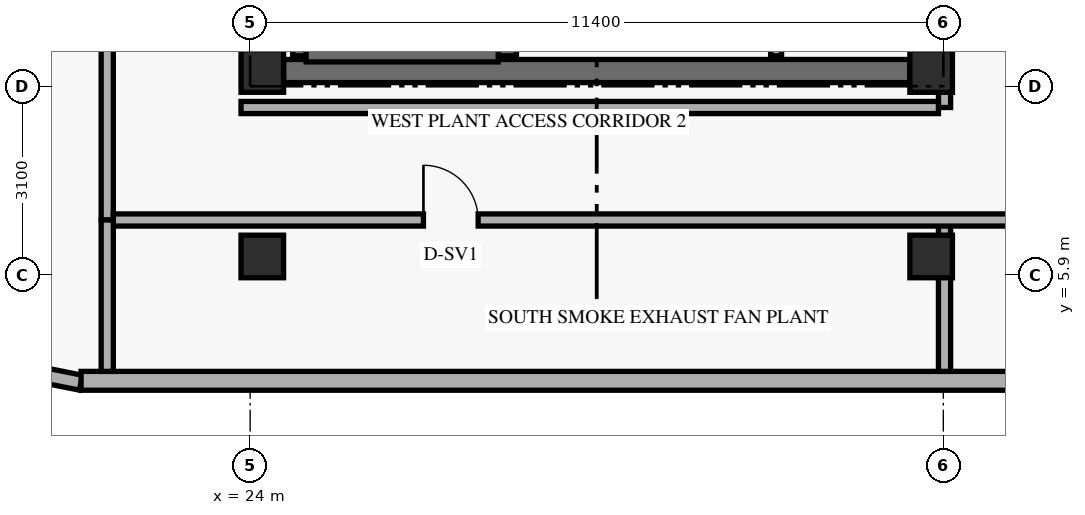
"""IFC4 building model, lengths in metres.
Left out: names, types, materials, properties, quantities, classifications, styles, units other than length and angle.
Written with IfcOpenShell. Run it as: python <this file> out.ifc"""

import sys

from ifc_helpers import new_model, si_unit, direction, frame, frame_2d, origin, origin_2d, place, context, subcontext, project, spatial, rectangle, extrude, element, fill, save


model = new_model("IFC4")
c1 = context("Model", 3, precision=1e-05, world=origin(), true_north=direction((0.0, 1.0)))
c2 = subcontext(c1, "Body", "Model", "MODEL_VIEW")
j1 = project(units=[si_unit("LENGTHUNIT", "METRE"), si_unit("PLANEANGLEUNIT", "RADIAN")], contexts=[c1])
p1 = place(None, origin())
s1 = spatial("IfcSite", under=j1, at=p1, CompositionType="ELEMENT")
p2 = place(p1, origin())
s2 = spatial("IfcBuilding", under=s1, at=p2, CompositionType="ELEMENT")
p3 = place(p2, frame((0.0, 0.0, 199.8)))
s3 = spatial("IfcBuildingStorey", under=s2, at=p3, CompositionType="ELEMENT", Elevation=199.8)
p4 = place(p3, frame((24.55, 9.25, 0.0), z_axis=(0.0, 0.0, 1.0), x_axis=(1.0, 0.0, 0.0)))
e1 = element("IfcWall", 1, at=p4, inside=s3, PredefinedType="SHEAR", context=c2, shape_type="SweptSolid", body=[
    extrude(rectangle(XDim=10.3, YDim=0.38, at=frame_2d((5.15, 0.0))), origin(), (0.0, 0.0, 1.0), 5.76),
])
p5 = place(p3, frame((24.81, 9.5, 0.0), z_axis=(0.0, 0.0, 1.0), x_axis=(0.0, 1.0, 0.0)))
e2 = element("IfcWall", 2, at=p5, inside=s3, PredefinedType="SHEAR", context=c2, shape_type="SweptSolid", body=[
    extrude(rectangle(XDim=7.76, YDim=0.22, at=frame_2d((3.88, 0.0))), origin(), (0.0, 0.0, 1.0), 5.76),
])
p6 = place(p3, frame((28.23, 9.5, 0.0), z_axis=(0.0, 0.0, 1.0), x_axis=(0.0, 1.0, 0.0)))
e3 = element("IfcWall", 3, at=p6, inside=s3, PredefinedType="SHEAR", context=c2, shape_type="SweptSolid", body=[
    extrude(rectangle(XDim=7.76, YDim=0.3, at=frame_2d((3.88, 0.0))), origin(), (0.0, 0.0, 1.0), 5.76),
])
p7 = place(p3, frame((24.92, 9.51, 0.0), z_axis=(0.0, 0.0, 1.0), x_axis=(1.0, 0.0, 0.0)))
e4 = element("IfcWall", 4, at=p7, inside=s3, PredefinedType="SHEAR", context=c2, shape_type="SweptSolid", body=[
    extrude(rectangle(XDim=3.16, YDim=0.22, at=frame_2d((1.58, 0.0))), origin(), (0.0, 0.0, 1.0), 5.76),
])
for number, where, z_axis, x_axis in (
    (5, (24.2, 6.2, 0.0), (0.0, 0.0, 1.0), (1.0, 0.0, 0.0)),
    (6, (24.2, 9.25, 0.0), (0.0, 0.0, 1.0), (1.0, 0.0, 0.0)),
    (7, (35.2, 6.2, 0.0), (0.0, 0.0, 1.0), (1.0, 0.0, 0.0)),
    (8, (35.2, 9.25, 0.0), (0.0, 0.0, 1.0), (1.0, 0.0, 0.0)),
):
    element("IfcColumn", number, at=place(p3, frame(where, z_axis=z_axis, x_axis=x_axis)), inside=s3, PredefinedType="COLUMN", context=c2, shape_type="SweptSolid", body=[
        extrude(rectangle(XDim=0.7, YDim=0.7, at=origin_2d()), origin(), (0.0, 0.0, 1.0), 6.0),
    ])
p8 = place(p3, frame((19.854, 4.395, 0.0), z_axis=(0.0, 0.0, 1.0), x_axis=(0.980809899341, -0.19496651342, 0.0)))
e9 = element("IfcWall", 9, at=p8, inside=s3, PredefinedType="SOLIDWALL", context=c2, shape_type="SweptSolid", body=[
    extrude(rectangle(XDim=1.389, YDim=0.25, at=frame_2d((0.694, 0.0))), origin(), (0.0, 0.0, 1.0), 5.76),
])
p9 = place(p3, frame((21.22, 4.155, 0.0), z_axis=(0.0, 0.0, 1.0), x_axis=(1.0, 0.0, 0.0)))
e10 = element("IfcWall", 10, at=p9, inside=s3, PredefinedType="SOLIDWALL", context=c2, shape_type="SweptSolid", body=[
    extrude(rectangle(XDim=33.76, YDim=0.31, at=frame_2d((16.88, 0.0))), origin(), (0.0, 0.0, 1.0), 5.76),
])
p10 = place(p3, frame((32.65, 9.5, 0.0), z_axis=(0.0, 0.0, 1.0), x_axis=(0.0, 1.0, 0.0)))
e11 = element("IfcWall", 11, at=p10, inside=s3, PredefinedType="STANDARD", context=c2, shape_type="SweptSolid", body=[
    extrude(rectangle(XDim=6.08, YDim=0.18, at=frame_2d((3.04, 0.0))), origin(), (0.0, 0.0, 1.0), 5.76),
])
p11 = place(p10, frame((0.63, 0.0, 0.0)))
e12 = element("IfcOpeningElement", 12, at=p11, cuts=e11, PredefinedType="OPENING", context=c2, shape_type="SweptSolid", body=[
    extrude(rectangle(XDim=0.9, YDim=2.1, at=frame_2d((0.45, 1.05))), frame((0.0, 0.1, 0.0), z_axis=(0.0, -1.0, 0.0), x_axis=(1.0, 0.0, 0.0)), (0.0, 0.0, 1.0), 0.2),
])
p12 = place(p10, frame((2.63, 0.0, 0.0)))
e13 = element("IfcOpeningElement", 13, at=p12, cuts=e11, PredefinedType="OPENING", context=c2, shape_type="SweptSolid", body=[
    extrude(rectangle(XDim=0.9, YDim=2.1, at=frame_2d((0.45, 1.05))), frame((0.0, 0.1, 0.0), z_axis=(0.0, -1.0, 0.0), x_axis=(1.0, 0.0, 0.0)), (0.0, 0.0, 1.0), 0.2),
])
p13 = place(p10, frame((4.63, 0.0, 0.0)))
e14 = element("IfcOpeningElement", 14, at=p13, cuts=e11, PredefinedType="OPENING", context=c2, shape_type="SweptSolid", body=[
    extrude(rectangle(XDim=0.9, YDim=2.1, at=frame_2d((0.45, 1.05))), frame((0.0, 0.1, 0.0), z_axis=(0.0, -1.0, 0.0), x_axis=(1.0, 0.0, 0.0)), (0.0, 0.0, 1.0), 0.2),
])
p14 = place(p3, frame((35.42, 4.31, 0.0), z_axis=(0.0, 0.0, 1.0), x_axis=(0.0, 1.0, 0.0)))
e15 = element("IfcWall", 15, at=p14, inside=s3, PredefinedType="STANDARD", context=c2, shape_type="SweptSolid", body=[
    extrude(rectangle(XDim=2.49, YDim=0.2, at=frame_2d((1.245, 0.0))), origin(), (0.0, 0.0, 1.0), 5.13),
])
p15 = place(p3, frame((35.42, 8.65, 0.0), z_axis=(0.0, 0.0, 1.0), x_axis=(0.0, 1.0, 0.0)))
e16 = element("IfcWall", 16, at=p15, inside=s3, PredefinedType="STANDARD", context=c2, shape_type="SweptSolid", body=[
    extrude(rectangle(XDim=0.6, YDim=0.2, at=frame_2d((0.3, 0.0))), origin(), (0.0, 0.0, 1.0), 5.13),
])
p16 = place(p3, frame((21.65, 6.8, 0.0), z_axis=(0.0, 0.0, 1.0), x_axis=(0.0, 1.0, 0.0)))
e17 = element("IfcWall", 17, at=p16, inside=s3, PredefinedType="STANDARD", context=c2, shape_type="SweptSolid", body=[
    extrude(rectangle(XDim=34.4, YDim=0.2, at=frame_2d((17.2, 0.0))), origin(), (0.0, 0.0, 1.0), 5.13),
])
p17 = place(p16, frame((7.0, 0.0, 0.0)))
e18 = element("IfcOpeningElement", 18, at=p17, cuts=e17, PredefinedType="OPENING", context=c2, shape_type="SweptSolid", body=[
    extrude(rectangle(XDim=1.05, YDim=2.15, at=frame_2d((0.525, 1.075))), frame((0.0, 0.11, 0.0), z_axis=(0.0, -1.0, 0.0), x_axis=(1.0, 0.0, 0.0)), (0.0, 0.0, 1.0), 0.22),
])
p18 = place(p16, frame((21.0, 0.0, 0.0)))
e19 = element("IfcOpeningElement", 19, at=p18, cuts=e17, PredefinedType="OPENING", context=c2, shape_type="SweptSolid", body=[
    extrude(rectangle(XDim=1.05, YDim=2.15, at=frame_2d((0.525, 1.075))), frame((0.0, 0.11, 0.0), z_axis=(0.0, -1.0, 0.0), x_axis=(1.0, 0.0, 0.0)), (0.0, 0.0, 1.0), 0.22),
])
p19 = place(p3, frame((21.75, 6.8, 0.0), z_axis=(0.0, 0.0, 1.0), x_axis=(1.0, 0.0, 0.0)))
e20 = element("IfcWall", 20, at=p19, inside=s3, PredefinedType="STANDARD", context=c2, shape_type="SweptSolid", body=[
    extrude(rectangle(XDim=15.6, YDim=0.2, at=frame_2d((7.8, 0.0))), origin(), (0.0, 0.0, 1.0), 5.13),
])
p20 = place(p19, frame((5.1, 0.0, 0.0)))
e21 = element("IfcOpeningElement", 21, at=p20, cuts=e20, PredefinedType="OPENING", context=c2, shape_type="SweptSolid", body=[
    extrude(rectangle(XDim=0.9, YDim=2.1, at=frame_2d((0.45, 1.05))), frame((0.0, 0.11, 0.0), z_axis=(0.0, -1.0, 0.0), x_axis=(1.0, 0.0, 0.0)), (0.0, 0.0, 1.0), 0.22),
])
p21 = place(p3, frame((23.85, 8.65, 0.0), z_axis=(0.0, 0.0, 1.0), x_axis=(1.0, 0.0, 0.0)))
e22 = element("IfcWall", 22, at=p21, inside=s3, PredefinedType="STANDARD", context=c2, shape_type="SweptSolid", body=[
    extrude(rectangle(XDim=11.47, YDim=0.2, at=frame_2d((5.735, 0.0))), origin(), (0.0, 0.0, 1.0), 5.13),
])
p22 = place(p3, frame((21.65, 4.31, 0.0), z_axis=(0.0, 0.0, 1.0), x_axis=(0.0, 1.0, 0.0)))
e23 = element("IfcWall", 23, at=p22, inside=s3, PredefinedType="STANDARD", context=c2, shape_type="SweptSolid", body=[
    extrude(rectangle(XDim=2.49, YDim=0.2, at=frame_2d((1.245, 0.0))), origin(), (0.0, 0.0, 1.0), 5.279),
])
p23 = place(p20, origin())
e24 = element("IfcDoor", 24, at=p23, inside=s3, OperationType="SINGLE_SWING_LEFT", PredefinedType="DOOR", context=c2, shape_type="SweptSolid", body=[
    extrude(rectangle(XDim=0.9, YDim=2.1, at=frame_2d((0.45, 1.05))), frame((0.0, 0.025, 0.0), z_axis=(0.0, -1.0, 0.0), x_axis=(1.0, 0.0, 0.0)), (0.0, 0.0, 1.0), 0.05),
])
fill(e21, e24)
save(model, sys.argv[1])
